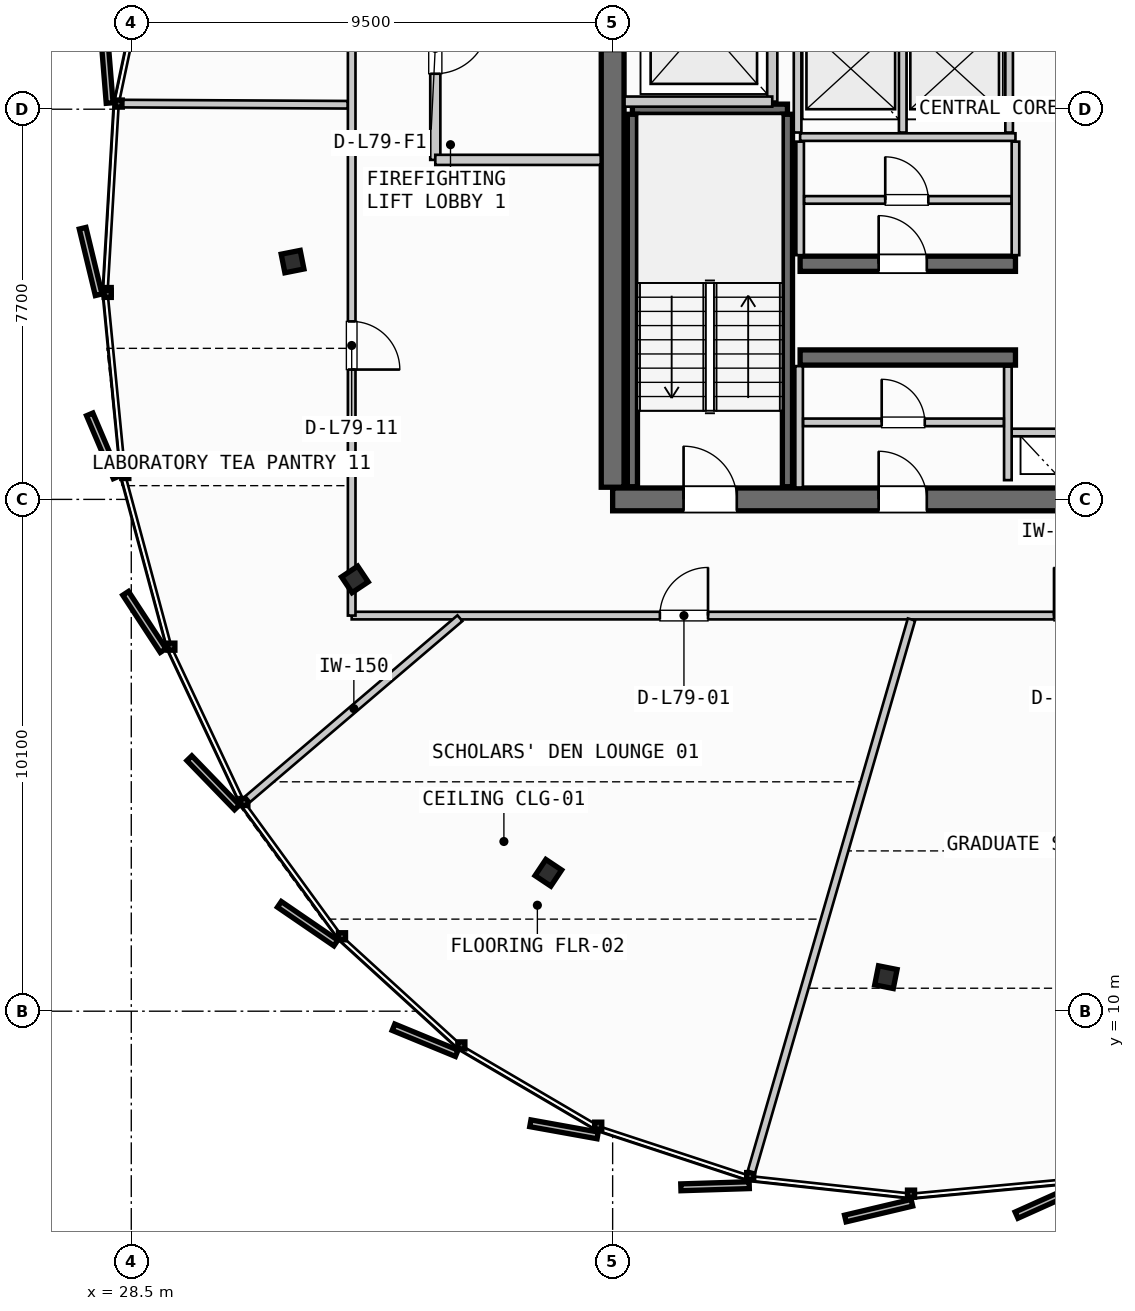
"""IFC4 building model, lengths in metres.
Left out: names, types, materials, properties, quantities, classifications, styles, units other than length and angle.
Written with IfcOpenShell. Run it as: python <this file> out.ifc"""

import sys

from ifc_helpers import new_model, si_unit, direction, frame, frame_2d, origin, origin_2d, place, context, subcontext, project, spatial, rectangle, i_section, extrude, source, transform, mapped, element, fill, save


model = new_model("IFC4")
c1 = context("Model", 3, precision=1e-05, world=origin(), true_north=direction((0.0, 1.0)))
c2 = subcontext(c1, "Body", "Model", "MODEL_VIEW")
j1 = project(units=[si_unit("LENGTHUNIT", "METRE"), si_unit("PLANEANGLEUNIT", "RADIAN")], contexts=[c1])
p1 = place(None, origin())
s1 = spatial("IfcSite", under=j1, at=p1, CompositionType="ELEMENT")
p2 = place(p1, origin())
s2 = spatial("IfcBuilding", under=s1, at=p2, CompositionType="ELEMENT")
p3 = place(p2, frame((0.0, 0.0, 297.4)))
s3 = spatial("IfcBuildingStorey", under=s2, at=p3, CompositionType="ELEMENT", Elevation=297.4)
p4 = place(p3, frame((38.0, 20.1, 0.0), z_axis=(0.0, 0.0, 1.0), x_axis=(1.0, 0.0, 0.0)))
e1 = element("IfcWall", 1, at=p4, inside=s3, PredefinedType="SHEAR", context=c2, shape_type="SweptSolid", body=[
    extrude(rectangle(XDim=17.6, YDim=0.45, at=frame_2d((8.8, 0.0))), origin(), (0.0, 0.0, 1.0), 3.21),
])
p5 = place(p4, frame((1.4, 0.0, 0.0)))
e2 = element("IfcOpeningElement", 2, at=p5, cuts=e1, PredefinedType="OPENING", context=c2, shape_type="SweptSolid", body=[
    extrude(rectangle(XDim=1.05, YDim=2.15, at=frame_2d((0.525, 1.075))), frame((0.0, 0.235, 0.0), z_axis=(0.0, -1.0, 0.0), x_axis=(1.0, 0.0, 0.0)), (0.0, 0.0, 1.0), 0.47),
])
p6 = place(p4, frame((15.15, 0.0, 0.0)))
e3 = element("IfcOpeningElement", 3, at=p6, cuts=e1, PredefinedType="OPENING", context=c2, shape_type="SweptSolid", body=[
    extrude(rectangle(XDim=1.05, YDim=2.15, at=frame_2d((0.525, 1.075))), frame((0.0, 0.235, 0.0), z_axis=(0.0, -1.0, 0.0), x_axis=(1.0, 0.0, 0.0)), (0.0, 0.0, 1.0), 0.47),
])
p7 = place(p4, frame((5.25, 0.0, 0.0)))
e4 = element("IfcOpeningElement", 4, at=p7, cuts=e1, PredefinedType="OPENING", context=c2, shape_type="SweptSolid", body=[
    extrude(rectangle(XDim=0.95, YDim=2.15, at=frame_2d((0.475, 1.075))), frame((0.0, 0.235, 0.0), z_axis=(0.0, -1.0, 0.0), x_axis=(1.0, 0.0, 0.0)), (0.0, 0.0, 1.0), 0.47),
])
p8 = place(p4, frame((11.4, 0.0, 0.0)))
e5 = element("IfcOpeningElement", 5, at=p8, cuts=e1, PredefinedType="OPENING", context=c2, shape_type="SweptSolid", body=[
    extrude(rectangle(XDim=0.95, YDim=2.15, at=frame_2d((0.475, 1.075))), frame((0.0, 0.235, 0.0), z_axis=(0.0, -1.0, 0.0), x_axis=(1.0, 0.0, 0.0)), (0.0, 0.0, 1.0), 0.47),
])
p9 = place(p3, frame((38.0, 35.26, 0.0), z_axis=(0.0, 0.0, 1.0), x_axis=(0.0, -1.0, 0.0)))
e6 = element("IfcWall", 6, at=p9, inside=s3, PredefinedType="SHEAR", context=c2, shape_type="SweptSolid", body=[
    extrude(rectangle(XDim=14.92, YDim=0.45, at=frame_2d((7.46, 0.0))), origin(), (0.0, 0.0, 1.0), 3.21),
])
p10 = place(p9, frame((5.21, 0.0, 0.0)))
e7 = element("IfcOpeningElement", 7, at=p10, cuts=e6, PredefinedType="OPENING", context=c2, shape_type="SweptSolid", body=[
    extrude(rectangle(XDim=1.1, YDim=2.2, at=frame_2d((0.55, 1.1))), frame((0.0, 0.235, 0.0), z_axis=(0.0, -1.0, 0.0), x_axis=(1.0, 0.0, 0.0)), (0.0, 0.0, 1.0), 0.47),
])
p11 = place(p3, frame((41.7, 22.9, 0.0), z_axis=(0.0, 0.0, 1.0), x_axis=(1.0, 0.0, 0.0)))
e8 = element("IfcWall", 8, at=p11, inside=s3, PredefinedType="SHEAR", context=c2, shape_type="SweptSolid", body=[
    extrude(rectangle(XDim=4.25, YDim=0.3, at=frame_2d((2.125, 0.0))), origin(), (0.0, 0.0, 1.0), 3.21),
])
p12 = place(p3, frame((41.7, 24.75, 0.0), z_axis=(0.0, 0.0, 1.0), x_axis=(1.0, 0.0, 0.0)))
e9 = element("IfcWall", 9, at=p12, inside=s3, PredefinedType="SHEAR", context=c2, shape_type="SweptSolid", body=[
    extrude(rectangle(XDim=4.25, YDim=0.3, at=frame_2d((2.125, 0.0))), origin(), (0.0, 0.0, 1.0), 3.21),
])
p13 = place(p12, frame((1.55, 0.0, 0.0)))
e10 = element("IfcOpeningElement", 10, at=p13, cuts=e9, PredefinedType="OPENING", context=c2, shape_type="SweptSolid", body=[
    extrude(rectangle(XDim=0.95, YDim=2.15, at=frame_2d((0.475, 1.075))), frame((0.0, 0.16, 0.0), z_axis=(0.0, -1.0, 0.0), x_axis=(1.0, 0.0, 0.0)), (0.0, 0.0, 1.0), 0.32),
])
m1 = source(origin(), c2, "Body", "SweptSolid", [
    extrude(i_section(OverallWidth=0.374, OverallDepth=0.383, WebThickness=0.017, FlangeThickness=0.026, FilletRadius=0.015, at=origin_2d()), origin(), (0.0, 0.0, 1.0), 3.21),
])
for number, where, z_axis, x_axis in (
    (11, (31.683, 24.793, 0.0), (0.0, 0.0, 1.0), (-0.981, -0.195, 0.0)),
    (12, (32.913, 18.521, 0.0), (0.0, 0.0, 1.0), (-0.831, -0.556, 0.0)),
    (13, (36.731, 12.731, 0.0), (0.0, 0.0, 1.0), (-0.556, -0.831, 0.0)),
    (14, (43.393, 10.671, 0.0), (0.0, 0.0, 1.0), (-0.195, -0.981, 0.0)),
):
    element("IfcColumn", number, at=place(p3, frame(where, z_axis=z_axis, x_axis=x_axis)), inside=s3, PredefinedType="COLUMN", context=c2, shape_type="MappedRepresentation", body=[
        mapped(m1, transform((0.0, 0.0, 0.0), scale=1.0)),
    ])
p14 = place(p3, frame((38.39, 27.8, 0.0), z_axis=(0.0, 0.0, 1.0), x_axis=(1.0, 0.0, 0.0)))
e15 = element("IfcWall", 15, at=p14, inside=s3, PredefinedType="SHEAR", context=c2, shape_type="SweptSolid", body=[
    extrude(rectangle(XDim=3.06, YDim=0.2, at=frame_2d((1.53, 0.0))), origin(), (0.0, 0.0, 1.0), 3.21),
])
for number, where, z_axis, x_axis in (
    (16, (41.45, 27.7, 0.0), (0.0, 0.0, 1.0), (0.0, -1.0, 0.0)),
    (17, (38.39, 20.35, 0.0), (0.0, 0.0, 1.0), (0.0, 1.0, 0.0)),
):
    element("IfcWall", number, at=place(p3, frame(where, z_axis=z_axis, x_axis=x_axis)), inside=s3, PredefinedType="SHEAR", context=c2, shape_type="SweptSolid", body=[
        extrude(rectangle(XDim=7.35, YDim=0.2, at=frame_2d((3.675, 0.0))), origin(), (0.0, 0.0, 1.0), 3.21),
    ])
p15 = place(p3, frame((45.8, 21.42, 0.0), z_axis=(0.0, 0.0, 1.0), x_axis=(1.0, 0.0, 0.0)))
e18 = element("IfcWall", 18, at=p15, inside=s3, PredefinedType="PARTITIONING", context=c2, shape_type="SweptSolid", body=[
    extrude(rectangle(XDim=2.0, YDim=0.15, at=frame_2d((1.0, 0.0))), origin(), (0.0, 0.0, 1.0), 2.28),
])
p16 = place(p3, frame((45.8, 20.48, 0.0), z_axis=(0.0, 0.0, 1.0), x_axis=(0.0, 1.0, 0.0)))
e19 = element("IfcWall", 19, at=p16, inside=s3, PredefinedType="PARTITIONING", context=c2, shape_type="SweptSolid", body=[
    extrude(rectangle(XDim=2.24, YDim=0.15, at=frame_2d((1.12, 0.0))), origin(), (0.0, 0.0, 1.0), 2.28),
])
p17 = place(p3, frame((41.15, 27.95, 0.0), z_axis=(0.0, 0.0, 1.0), x_axis=(0.0, 1.0, 0.0)))
e20 = element("IfcWall", 20, at=p17, inside=s3, PredefinedType="PARTITIONING", context=c2, shape_type="SweptSolid", body=[
    extrude(rectangle(XDim=3.1, YDim=0.2, at=frame_2d((1.55, 0.0))), origin(), (0.0, 0.0, 1.0), 2.28),
])
p18 = place(p3, frame((38.235, 27.95, 0.0), z_axis=(0.0, 0.0, 1.0), x_axis=(1.0, 0.0, 0.0)))
e21 = element("IfcWall", 21, at=p18, inside=s3, PredefinedType="PARTITIONING", context=c2, shape_type="SweptSolid", body=[
    extrude(rectangle(XDim=2.915, YDim=0.2, at=frame_2d((1.458, 0.0))), origin(), (0.0, 0.0, 1.0), 2.28),
])
p19 = place(p3, frame((34.5, 31.2, 0.0), z_axis=(0.0, 0.0, 1.0), x_axis=(0.0, -1.0, 0.0)))
e22 = element("IfcWall", 22, at=p19, inside=s3, PredefinedType="PARTITIONING", context=c2, shape_type="SweptSolid", body=[
    extrude(rectangle(XDim=4.4, YDim=0.2, at=frame_2d((2.2, 0.0))), origin(), (0.0, 0.0, 1.0), 2.28),
])
p20 = place(p19, frame((1.65, 0.0, 0.0)))
e23 = element("IfcOpeningElement", 23, at=p20, cuts=e22, PredefinedType="OPENING", context=c2, shape_type="SweptSolid", body=[
    extrude(rectangle(XDim=1.05, YDim=2.15, at=frame_2d((0.525, 1.075))), frame((0.0, 0.11, 0.0), z_axis=(0.0, -1.0, 0.0), x_axis=(1.0, 0.0, 0.0)), (0.0, 0.0, 1.0), 0.22),
])
p21 = place(p3, frame((34.5, 26.8, 0.0), z_axis=(0.0, 0.0, 1.0), x_axis=(1.0, 0.0, 0.0)))
e24 = element("IfcWall", 24, at=p21, inside=s3, PredefinedType="PARTITIONING", context=c2, shape_type="SweptSolid", body=[
    extrude(rectangle(XDim=3.265, YDim=0.2, at=frame_2d((1.632, 0.0))), origin(), (0.0, 0.0, 1.0), 2.28),
])
p22 = place(p3, frame((41.68, 20.335, 0.0), z_axis=(0.0, 0.0, 1.0), x_axis=(0.0, 1.0, 0.0)))
e25 = element("IfcWall", 25, at=p22, inside=s3, PredefinedType="PARTITIONING", context=c2, shape_type="SweptSolid", body=[
    extrude(rectangle(XDim=2.395, YDim=0.15, at=frame_2d((1.198, 0.0))), origin(), (0.0, 0.0, 1.0), 2.28),
])
p23 = place(p3, frame((41.76, 21.62, 0.0), z_axis=(0.0, 0.0, 1.0), x_axis=(1.0, 0.0, 0.0)))
e26 = element("IfcWall", 26, at=p23, inside=s3, PredefinedType="PARTITIONING", context=c2, shape_type="SweptSolid", body=[
    extrude(rectangle(XDim=3.96, YDim=0.15, at=frame_2d((1.98, 0.0))), origin(), (0.0, 0.0, 1.0), 2.28),
])
p24 = place(p23, frame((1.55, 0.0, 0.0)))
e27 = element("IfcOpeningElement", 27, at=p24, cuts=e26, PredefinedType="OPENING", context=c2, shape_type="SweptSolid", body=[
    extrude(rectangle(XDim=0.85, YDim=2.15, at=frame_2d((0.425, 1.075))), frame((0.0, 0.085, 0.0), z_axis=(0.0, -1.0, 0.0), x_axis=(1.0, 0.0, 0.0)), (0.0, 0.0, 1.0), 0.17),
])
p25 = place(p3, frame((41.7, 27.25, 0.0), z_axis=(0.0, 0.0, 1.0), x_axis=(1.0, 0.0, 0.0)))
e28 = element("IfcWall", 28, at=p25, inside=s3, PredefinedType="PARTITIONING", context=c2, shape_type="SweptSolid", body=[
    extrude(rectangle(XDim=4.25, YDim=0.15, at=frame_2d((2.125, 0.0))), origin(), (0.0, 0.0, 1.0), 2.28),
])
for number, where, z_axis, x_axis in (
    (29, (41.7, 24.92, 0.0), (0.0, 0.0, 1.0), (0.0, 1.0, 0.0)),
    (30, (45.95, 24.92, 0.0), (0.0, 0.0, 1.0), (0.0, 1.0, 0.0)),
):
    element("IfcWall", number, at=place(p3, frame(where, z_axis=z_axis, x_axis=x_axis)), inside=s3, PredefinedType="PARTITIONING", context=c2, shape_type="SweptSolid", body=[
        extrude(rectangle(XDim=2.24, YDim=0.15, at=frame_2d((1.12, 0.0))), origin(), (0.0, 0.0, 1.0), 2.28),
    ])
p26 = place(p3, frame((41.78, 26.01, 0.0), z_axis=(0.0, 0.0, 1.0), x_axis=(1.0, 0.0, 0.0)))
e31 = element("IfcWall", 31, at=p26, inside=s3, PredefinedType="PARTITIONING", context=c2, shape_type="SweptSolid", body=[
    extrude(rectangle(XDim=4.09, YDim=0.15, at=frame_2d((2.045, 0.0))), origin(), (0.0, 0.0, 1.0), 2.28),
])
p27 = place(p26, frame((1.6, 0.0, 0.0)))
e32 = element("IfcOpeningElement", 32, at=p27, cuts=e31, PredefinedType="OPENING", context=c2, shape_type="SweptSolid", body=[
    extrude(rectangle(XDim=0.85, YDim=2.15, at=frame_2d((0.425, 1.075))), frame((0.0, 0.085, 0.0), z_axis=(0.0, -1.0, 0.0), x_axis=(1.0, 0.0, 0.0)), (0.0, 0.0, 1.0), 0.17),
])
for number, where, z_axis, x_axis in (
    (33, (41.65, 27.34, 0.0), (0.0, 0.0, 1.0), (0.0, 1.0, 0.0)),
    (34, (43.725, 27.34, 0.0), (0.0, 0.0, 1.0), (0.0, 1.0, 0.0)),
    (35, (45.825, 27.34, 0.0), (0.0, 0.0, 1.0), (0.0, 1.0, 0.0)),
):
    element("IfcWall", number, at=place(p3, frame(where, z_axis=z_axis, x_axis=x_axis)), inside=s3, PredefinedType="PARTITIONING", context=c2, shape_type="SweptSolid", body=[
        extrude(rectangle(XDim=2.34, YDim=0.15, at=frame_2d((1.17, 0.0))), origin(), (0.0, 0.0, 1.0), 2.28),
    ])
p28 = place(p3, frame((32.85, 17.807, 0.0), z_axis=(0.0, 0.0, 1.0), x_axis=(1.0, 0.0, 0.0)))
e36 = element("IfcWall", 36, at=p28, inside=s3, PredefinedType="PARTITIONING", context=c2, shape_type="SweptSolid", body=[
    extrude(rectangle(XDim=28.038, YDim=0.15, at=frame_2d((14.019, 0.0))), origin(), (0.0, 0.0, 1.0), 2.28),
])
p29 = place(p28, frame((6.082, 0.0, 0.0)))
e37 = element("IfcOpeningElement", 37, at=p29, cuts=e36, PredefinedType="OPENING", context=c2, shape_type="SweptSolid", body=[
    extrude(rectangle(XDim=0.95, YDim=2.15, at=frame_2d((0.475, 1.075))), frame((0.0, 0.085, 0.0), z_axis=(0.0, -1.0, 0.0), x_axis=(1.0, 0.0, 0.0)), (0.0, 0.0, 1.0), 0.17),
])
p30 = place(p28, frame((13.86, 0.0, 0.0)))
e38 = element("IfcOpeningElement", 38, at=p30, cuts=e36, PredefinedType="OPENING", context=c2, shape_type="SweptSolid", body=[
    extrude(rectangle(XDim=0.95, YDim=2.15, at=frame_2d((0.475, 1.075))), frame((0.0, 0.085, 0.0), z_axis=(0.0, -1.0, 0.0), x_axis=(1.0, 0.0, 0.0)), (0.0, 0.0, 1.0), 0.17),
])
p31 = place(p28, frame((22.051, 0.0, 0.0)))
e39 = element("IfcOpeningElement", 39, at=p31, cuts=e36, PredefinedType="OPENING", context=c2, shape_type="SweptSolid", body=[
    extrude(rectangle(XDim=0.95, YDim=2.15, at=frame_2d((0.475, 1.075))), frame((0.0, 0.085, 0.0), z_axis=(0.0, -1.0, 0.0), x_axis=(1.0, 0.0, 0.0)), (0.0, 0.0, 1.0), 0.17),
])
p32 = place(p3, frame((32.85, 37.331, 0.0), z_axis=(0.0, 0.0, 1.0), x_axis=(0.0, -1.0, 0.0)))
e40 = element("IfcWall", 40, at=p32, inside=s3, PredefinedType="PARTITIONING", context=c2, shape_type="SweptSolid", body=[
    extrude(rectangle(XDim=19.524, YDim=0.15, at=frame_2d((9.762, 0.0))), origin(), (0.0, 0.0, 1.0), 2.28),
])
p33 = place(p32, frame((4.249, 0.0, 0.0)))
e41 = element("IfcOpeningElement", 41, at=p33, cuts=e40, PredefinedType="OPENING", context=c2, shape_type="SweptSolid", body=[
    extrude(rectangle(XDim=0.95, YDim=2.15, at=frame_2d((0.475, 1.075))), frame((0.0, 0.085, 0.0), z_axis=(0.0, -1.0, 0.0), x_axis=(1.0, 0.0, 0.0)), (0.0, 0.0, 1.0), 0.17),
])
p34 = place(p32, frame((13.719, 0.0, 0.0)))
e42 = element("IfcOpeningElement", 42, at=p34, cuts=e40, PredefinedType="OPENING", context=c2, shape_type="SweptSolid", body=[
    extrude(rectangle(XDim=0.95, YDim=2.15, at=frame_2d((0.475, 1.075))), frame((0.0, 0.085, 0.0), z_axis=(0.0, -1.0, 0.0), x_axis=(1.0, 0.0, 0.0)), (0.0, 0.0, 1.0), 0.17),
])
p35 = place(p3, frame((34.986, 17.755, 0.0), z_axis=(0.0, 0.0, 1.0), x_axis=(-0.760980245206, -0.648775050696, 0.0)))
e43 = element("IfcWall", 43, at=p35, inside=s3, PredefinedType="PARTITIONING", context=c2, shape_type="SweptSolid", body=[
    extrude(rectangle(XDim=5.5, YDim=0.15, at=frame_2d((2.75, 0.0))), origin(), (0.0, 0.0, 1.0), 2.28),
])
p36 = place(p3, frame((43.898, 17.73, 0.0), z_axis=(0.0, 0.0, 1.0), x_axis=(-0.278345417283, -0.960481040249, 0.0)))
e44 = element("IfcWall", 44, at=p36, inside=s3, PredefinedType="PARTITIONING", context=c2, shape_type="SweptSolid", body=[
    extrude(rectangle(XDim=11.346, YDim=0.15, at=frame_2d((5.673, 0.0))), origin(), (0.0, 0.0, 1.0), 2.28),
])
p37 = place(p3, frame((32.77, 27.888, 0.0), z_axis=(0.0, 0.0, 1.0), x_axis=(-0.999986848115, 0.005128703296, 0.0)))
e45 = element("IfcWall", 45, at=p37, inside=s3, PredefinedType="PARTITIONING", context=c2, shape_type="SweptSolid", body=[
    extrude(rectangle(XDim=4.427, YDim=0.15, at=frame_2d((2.213, 0.0))), origin(), (0.0, 0.0, 1.0), 2.28),
])
m2 = source(origin(), c2, "Body", "SweptSolid", [
    extrude(rectangle(XDim=1.05, YDim=2.15, at=frame_2d((0.525, 1.075))), frame((0.0, 0.025, 0.0), z_axis=(0.0, -1.0, 0.0), x_axis=(1.0, 0.0, 0.0)), (0.0, 0.0, 1.0), 0.05),
])
p38 = place(p5, origin())
e46 = element("IfcDoor", 46, at=p38, inside=s3, OperationType="SINGLE_SWING_LEFT", PredefinedType="DOOR", context=c2, shape_type="MappedRepresentation", body=[
    mapped(m2, transform((0.0, 0.0, 0.0), scale=1.0)),
])
fill(e2, e46)
m3 = source(origin(), c2, "Body", "SweptSolid", [
    extrude(rectangle(XDim=0.95, YDim=2.15, at=frame_2d((0.475, 1.075))), frame((0.0, 0.025, 0.0), z_axis=(0.0, -1.0, 0.0), x_axis=(1.0, 0.0, 0.0)), (0.0, 0.0, 1.0), 0.05),
])
p39 = place(p7, origin())
e47 = element("IfcDoor", 47, at=p39, inside=s3, OperationType="SINGLE_SWING_LEFT", PredefinedType="DOOR", context=c2, shape_type="MappedRepresentation", body=[
    mapped(m3, transform((0.0, 0.0, 0.0), scale=1.0)),
])
fill(e4, e47)
p40 = place(p13, origin())
e48 = element("IfcDoor", 48, at=p40, inside=s3, OperationType="SINGLE_SWING_LEFT", PredefinedType="DOOR", context=c2, shape_type="MappedRepresentation", body=[
    mapped(m3, transform((0.0, 0.0, 0.0), scale=1.0)),
])
fill(e10, e48)
p41 = place(p20, origin())
e49 = element("IfcDoor", 49, at=p41, inside=s3, OperationType="SINGLE_SWING_LEFT", PredefinedType="DOOR", context=c2, shape_type="MappedRepresentation", body=[
    mapped(m2, transform((0.0, 0.0, 0.0), scale=1.0)),
])
fill(e23, e49)
m4 = source(origin(), c2, "Body", "SweptSolid", [
    extrude(rectangle(XDim=0.85, YDim=2.15, at=frame_2d((0.425, 1.075))), frame((0.0, 0.025, 0.0), z_axis=(0.0, -1.0, 0.0), x_axis=(1.0, 0.0, 0.0)), (0.0, 0.0, 1.0), 0.05),
])
p42 = place(p24, origin())
e50 = element("IfcDoor", 50, at=p42, inside=s3, OperationType="SINGLE_SWING_LEFT", PredefinedType="DOOR", context=c2, shape_type="MappedRepresentation", body=[
    mapped(m4, transform((0.0, 0.0, 0.0), scale=1.0)),
])
fill(e27, e50)
p43 = place(p27, origin())
e51 = element("IfcDoor", 51, at=p43, inside=s3, OperationType="SINGLE_SWING_LEFT", PredefinedType="DOOR", context=c2, shape_type="MappedRepresentation", body=[
    mapped(m4, transform((0.0, 0.0, 0.0), scale=1.0)),
])
fill(e32, e51)
p44 = place(p29, origin())
e52 = element("IfcDoor", 52, at=p44, inside=s3, OperationType="SINGLE_SWING_RIGHT", PredefinedType="DOOR", context=c2, shape_type="MappedRepresentation", body=[
    mapped(m3, transform((0.0, 0.0, 0.0), scale=1.0)),
])
fill(e37, e52)
p45 = place(p30, origin())
e53 = element("IfcDoor", 53, at=p45, inside=s3, OperationType="SINGLE_SWING_LEFT", PredefinedType="DOOR", context=c2, shape_type="MappedRepresentation", body=[
    mapped(m3, transform((0.0, 0.0, 0.0), scale=1.0)),
])
fill(e38, e53)
p46 = place(p34, origin())
e54 = element("IfcDoor", 54, at=p46, inside=s3, OperationType="SINGLE_SWING_RIGHT", PredefinedType="DOOR", context=c2, shape_type="MappedRepresentation", body=[
    mapped(m3, transform((0.0, 0.0, 0.0), scale=1.0)),
])
fill(e42, e54)
save(model, sys.argv[1])
